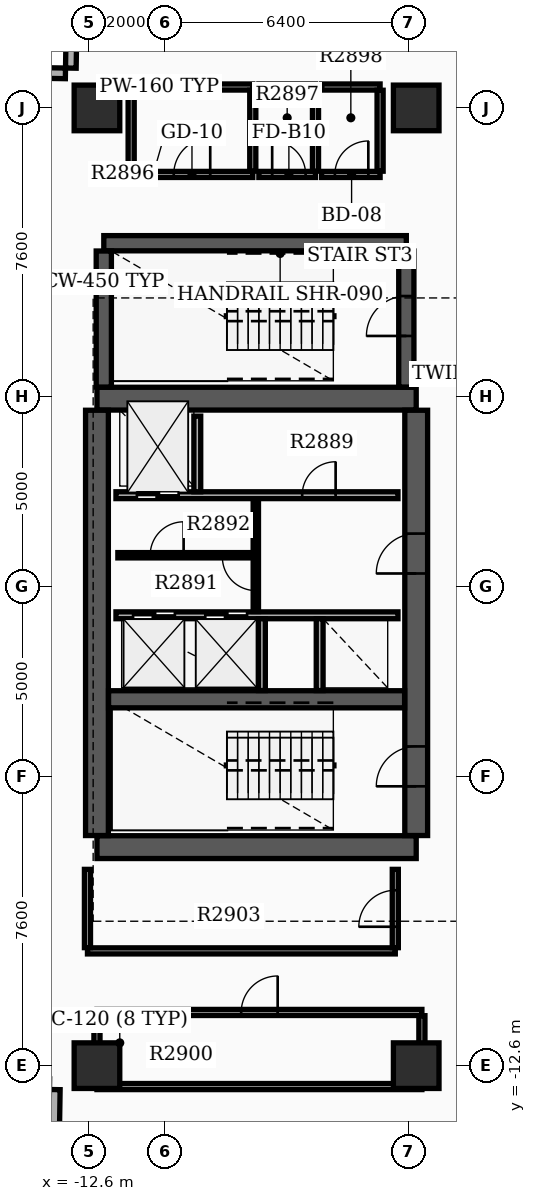
"""IFC4 building model, lengths in metres.
Left out: names, types, materials, properties, quantities, classifications, styles, units other than length and angle.
Written with IfcOpenShell. Run it as: python <this file> out.ifc"""

import sys

from ifc_helpers import new_model, si_unit, direction, frame, frame_2d, origin, origin_2d, place, context, subcontext, project, spatial, rectangle, extrude, element, fill, save


model = new_model("IFC4")
c1 = context("Model", 3, precision=1e-05, world=origin(), true_north=direction((0.0, 1.0)))
c2 = subcontext(c1, "Body", "Model", "MODEL_VIEW")
j1 = project(units=[si_unit("LENGTHUNIT", "METRE"), si_unit("PLANEANGLEUNIT", "RADIAN")], contexts=[c1])
p1 = place(None, origin())
s1 = spatial("IfcSite", under=j1, at=p1, CompositionType="ELEMENT")
p2 = place(p1, origin())
s2 = spatial("IfcBuilding", under=s1, at=p2, CompositionType="ELEMENT")
p3 = place(p2, frame((0.0, 0.0, 180.0)))
s3 = spatial("IfcBuildingStorey", under=s2, at=p3, CompositionType="ELEMENT", Elevation=180.0)
for number, where, z_axis, x_axis in (
    (1, (-12.4, -6.85, 0.0), (0.0, 0.0, 1.0), (1.0, 0.0, 0.0)),
    (2, (-12.4, 4.95, 0.0), (0.0, 0.0, 1.0), (1.0, 0.0, 0.0)),
):
    element("IfcWall", number, at=place(p3, frame(where, z_axis=z_axis, x_axis=x_axis)), inside=s3, PredefinedType="SHEAR", context=c2, shape_type="SweptSolid", body=[
        extrude(rectangle(XDim=8.4, YDim=0.6, at=frame_2d((4.2, 0.0))), origin(), (0.0, 0.0, 1.0), 3.7),
    ])
p4 = place(p3, frame((-12.4, -6.545, 0.0), z_axis=(0.0, 0.0, 1.0), x_axis=(0.0, 1.0, 0.0)))
e3 = element("IfcWall", 3, at=p4, inside=s3, PredefinedType="SHEAR", context=c2, shape_type="SweptSolid", body=[
    extrude(rectangle(XDim=11.19, YDim=0.6, at=frame_2d((5.595, 0.0))), origin(), (0.0, 0.0, 1.0), 3.7),
])
p5 = place(p3, frame((-4.0, -6.545, 0.0), z_axis=(0.0, 0.0, 1.0), x_axis=(0.0, 1.0, 0.0)))
e4 = element("IfcWall", 4, at=p5, inside=s3, PredefinedType="SHEAR", context=c2, shape_type="SweptSolid", body=[
    extrude(rectangle(XDim=11.19, YDim=0.6, at=frame_2d((5.595, 0.0))), origin(), (0.0, 0.0, 1.0), 3.7),
])
p6 = place(p5, frame((1.295, 0.0, 0.0)))
e5 = element("IfcOpeningElement", 5, at=p6, cuts=e4, PredefinedType="OPENING", context=c2, shape_type="SweptSolid", body=[
    extrude(rectangle(XDim=1.05, YDim=2.15, at=frame_2d((0.525, 1.075))), frame((0.0, 0.31, 0.0), z_axis=(0.0, -1.0, 0.0), x_axis=(1.0, 0.0, 0.0)), (0.0, 0.0, 1.0), 0.62),
])
p7 = place(p5, frame((6.895, 0.0, 0.0)))
e6 = element("IfcOpeningElement", 6, at=p7, cuts=e4, PredefinedType="OPENING", context=c2, shape_type="SweptSolid", body=[
    extrude(rectangle(XDim=1.05, YDim=2.15, at=frame_2d((0.525, 1.075))), frame((0.0, 0.31, 0.0), z_axis=(0.0, -1.0, 0.0), x_axis=(1.0, 0.0, 0.0)), (0.0, 0.0, 1.0), 0.62),
])
p8 = place(p3, frame((-12.095, -2.96, 0.0), z_axis=(0.0, 0.0, 1.0), x_axis=(1.0, 0.0, 0.0)))
e7 = element("IfcWall", 7, at=p8, inside=s3, PredefinedType="SHEAR", context=c2, shape_type="SweptSolid", body=[
    extrude(rectangle(XDim=7.79, YDim=0.45, at=frame_2d((3.895, 0.0))), origin(), (0.0, 0.0, 1.0), 3.7),
])
p9 = place(p3, frame((-12.22, 9.04, 0.0), z_axis=(0.0, 0.0, 1.0), x_axis=(1.0, 0.0, 0.0)))
e8 = element("IfcWall", 8, at=p9, inside=s3, PredefinedType="SHEAR", context=c2, shape_type="SweptSolid", body=[
    extrude(rectangle(XDim=7.96, YDim=0.4, at=frame_2d((3.98, 0.0))), origin(), (0.0, 0.0, 1.0), 3.7),
])
p10 = place(p3, frame((-12.22, 5.255, 0.0), z_axis=(0.0, 0.0, 1.0), x_axis=(0.0, 1.0, 0.0)))
e9 = element("IfcWall", 9, at=p10, inside=s3, PredefinedType="SHEAR", context=c2, shape_type="SweptSolid", body=[
    extrude(rectangle(XDim=3.58, YDim=0.4, at=frame_2d((1.79, 0.0))), origin(), (0.0, 0.0, 1.0), 3.7),
])
p11 = place(p3, frame((-4.26, 5.255, 0.0), z_axis=(0.0, 0.0, 1.0), x_axis=(0.0, 1.0, 0.0)))
e10 = element("IfcWall", 10, at=p11, inside=s3, PredefinedType="SHEAR", context=c2, shape_type="SweptSolid", body=[
    extrude(rectangle(XDim=3.58, YDim=0.4, at=frame_2d((1.79, 0.0))), origin(), (0.0, 0.0, 1.0), 3.7),
])
p12 = place(p11, frame((1.345, 0.0, 0.0)))
e11 = element("IfcOpeningElement", 11, at=p12, cuts=e10, PredefinedType="OPENING", context=c2, shape_type="SweptSolid", body=[
    extrude(rectangle(XDim=1.05, YDim=2.15, at=frame_2d((0.525, 1.075))), frame((0.0, 0.21, 0.0), z_axis=(0.0, -1.0, 0.0), x_axis=(1.0, 0.0, 0.0)), (0.0, 0.0, 1.0), 0.42),
])
for number, where, z_axis, x_axis in (
    (12, (-12.4, -12.6, 0.0), (0.0, 0.0, 1.0), (1.0, 0.0, 0.0)),
    (13, (-12.4, 12.6, 0.0), (0.0, 0.0, 1.0), (1.0, 0.0, 0.0)),
    (14, (-4.0, -12.6, 0.0), (0.0, 0.0, 1.0), (1.0, 0.0, 0.0)),
    (15, (-4.0, 12.6, 0.0), (0.0, 0.0, 1.0), (1.0, 0.0, 0.0)),
):
    element("IfcColumn", number, at=place(p3, frame(where, z_axis=z_axis, x_axis=x_axis)), inside=s3, PredefinedType="COLUMN", context=c2, shape_type="SweptSolid", body=[
        extrude(rectangle(XDim=1.2, YDim=1.2, at=origin_2d()), origin(), (0.0, 0.0, 1.0), 3.9),
    ])
p13 = place(p3, frame((-14.449, 13.529, 0.0), z_axis=(0.0, 0.0, 1.0), x_axis=(0.999878147354, -0.015610587569, 0.0)))
e16 = element("IfcWall", 16, at=p13, inside=s3, PredefinedType="STANDARD", context=c2, shape_type="SweptSolid", body=[
    extrude(rectangle(XDim=1.22, YDim=0.28, at=frame_2d((0.61, 0.0))), origin(), (0.0, 0.0, 1.0), 2.97),
])
p14 = place(p3, frame((-13.087, 13.647, 0.0), z_axis=(0.0, 0.0, 1.0), x_axis=(0.015785793208, 0.999875396603, 0.0)))
e17 = element("IfcWall", 17, at=p14, inside=s3, PredefinedType="STANDARD", context=c2, shape_type="SweptSolid", body=[
    extrude(rectangle(XDim=1.5, YDim=0.28, at=frame_2d((0.75, 0.0))), origin(), (0.0, 0.0, 1.0), 2.97),
])
p15 = place(p3, frame((-13.51, -13.229, 0.0), z_axis=(0.0, 0.0, 1.0), x_axis=(-0.015625635615, -0.999877912303, 0.0)))
e18 = element("IfcWall", 18, at=p15, inside=s3, PredefinedType="STANDARD", context=c2, shape_type="SweptSolid", body=[
    extrude(rectangle(XDim=1.5, YDim=0.28, at=frame_2d((0.75, 0.0))), origin(), (0.0, 0.0, 1.0), 2.97),
])
p16 = place(p3, frame((-11.9, 2.41, 0.0), z_axis=(0.0, 0.0, 1.0), x_axis=(1.0, 0.0, 0.0)))
e19 = element("IfcWall", 19, at=p16, inside=s3, PredefinedType="SOLIDWALL", context=c2, shape_type="SweptSolid", body=[
    extrude(rectangle(XDim=7.42, YDim=0.18, at=frame_2d((3.71, 0.0))), origin(), (0.0, 0.0, 1.0), 2.96),
])
p17 = place(p16, frame((0.55, 0.0, 0.0)))
e20 = element("IfcOpeningElement", 20, at=p17, cuts=e19, PredefinedType="OPENING", context=c2, shape_type="SweptSolid", body=[
    extrude(rectangle(XDim=1.1, YDim=2.15, at=frame_2d((0.55, 1.075))), frame((0.0, 0.1, 0.0), z_axis=(0.0, -1.0, 0.0), x_axis=(1.0, 0.0, 0.0)), (0.0, 0.0, 1.0), 0.2),
])
p18 = place(p16, frame((4.9, 0.0, 0.0)))
e21 = element("IfcOpeningElement", 21, at=p18, cuts=e19, PredefinedType="OPENING", context=c2, shape_type="SweptSolid", body=[
    extrude(rectangle(XDim=0.88, YDim=2.1, at=frame_2d((0.44, 1.05))), frame((0.0, 0.1, 0.0), z_axis=(0.0, -1.0, 0.0), x_axis=(1.0, 0.0, 0.0)), (0.0, 0.0, 1.0), 0.2),
])
p19 = place(p3, frame((-11.9, -0.75, 0.0), z_axis=(0.0, 0.0, 1.0), x_axis=(1.0, 0.0, 0.0)))
e22 = element("IfcWall", 22, at=p19, inside=s3, PredefinedType="SOLIDWALL", context=c2, shape_type="SweptSolid", body=[
    extrude(rectangle(XDim=7.42, YDim=0.18, at=frame_2d((3.71, 0.0))), origin(), (0.0, 0.0, 1.0), 2.96),
])
p20 = place(p19, frame((0.45, 0.0, 0.0)))
e23 = element("IfcOpeningElement", 23, at=p20, cuts=e22, PredefinedType="OPENING", context=c2, shape_type="SweptSolid", body=[
    extrude(rectangle(XDim=1.1, YDim=2.15, at=frame_2d((0.55, 1.075))), frame((0.0, 0.1, 0.0), z_axis=(0.0, -1.0, 0.0), x_axis=(1.0, 0.0, 0.0)), (0.0, 0.0, 1.0), 0.2),
])
p21 = place(p19, frame((2.35, 0.0, 0.0)))
e24 = element("IfcOpeningElement", 24, at=p21, cuts=e22, PredefinedType="OPENING", context=c2, shape_type="SweptSolid", body=[
    extrude(rectangle(XDim=1.1, YDim=2.15, at=frame_2d((0.55, 1.075))), frame((0.0, 0.1, 0.0), z_axis=(0.0, -1.0, 0.0), x_axis=(1.0, 0.0, 0.0)), (0.0, 0.0, 1.0), 0.2),
])
p22 = place(p3, frame((-9.76, 2.5, 0.0), z_axis=(0.0, 0.0, 1.0), x_axis=(0.0, 1.0, 0.0)))
e25 = element("IfcWall", 25, at=p22, inside=s3, PredefinedType="SOLIDWALL", context=c2, shape_type="SweptSolid", body=[
    extrude(rectangle(XDim=1.99, YDim=0.18, at=frame_2d((0.995, 0.0))), origin(), (0.0, 0.0, 1.0), 2.96),
])
for number, where, z_axis, x_axis in (
    (26, (-8.06, -2.73, 0.0), (0.0, 0.0, 1.0), (0.0, 1.0, 0.0)),
    (27, (-6.54, -2.73, 0.0), (0.0, 0.0, 1.0), (0.0, 1.0, 0.0)),
):
    element("IfcWall", number, at=place(p3, frame(where, z_axis=z_axis, x_axis=x_axis)), inside=s3, PredefinedType="SOLIDWALL", context=c2, shape_type="SweptSolid", body=[
        extrude(rectangle(XDim=1.89, YDim=0.18, at=frame_2d((0.945, 0.0))), origin(), (0.0, 0.0, 1.0), 2.96),
    ])
p23 = place(p3, frame((-8.22, -0.65, 0.0), z_axis=(0.0, 0.0, 1.0), x_axis=(0.0, 1.0, 0.0)))
e28 = element("IfcWall", 28, at=p23, inside=s3, PredefinedType="SOLIDWALL", context=c2, shape_type="SweptSolid", body=[
    extrude(rectangle(XDim=2.96, YDim=0.14, at=frame_2d((1.48, 0.0))), origin(), (0.0, 0.0, 1.0), 2.96),
])
p24 = place(p23, frame((0.55, 0.0, 0.0)))
e29 = element("IfcOpeningElement", 29, at=p24, cuts=e28, PredefinedType="OPENING", context=c2, shape_type="SweptSolid", body=[
    extrude(rectangle(XDim=0.88, YDim=2.1, at=frame_2d((0.44, 1.05))), frame((0.0, 0.08, 0.0), z_axis=(0.0, -1.0, 0.0), x_axis=(1.0, 0.0, 0.0)), (0.0, 0.0, 1.0), 0.16),
])
p25 = place(p3, frame((-11.85, 0.83, 0.0), z_axis=(0.0, 0.0, 1.0), x_axis=(1.0, 0.0, 0.0)))
e30 = element("IfcWall", 30, at=p25, inside=s3, PredefinedType="PARTITIONING", context=c2, shape_type="SweptSolid", body=[
    extrude(rectangle(XDim=3.552, YDim=0.14, at=frame_2d((1.776, 0.0))), origin(), (0.0, 0.0, 1.0), 2.96),
])
p26 = place(p25, frame((0.85, 0.0, 0.0)))
e31 = element("IfcOpeningElement", 31, at=p26, cuts=e30, PredefinedType="OPENING", context=c2, shape_type="SweptSolid", body=[
    extrude(rectangle(XDim=0.88, YDim=2.1, at=frame_2d((0.44, 1.05))), frame((0.0, 0.08, 0.0), z_axis=(0.0, -1.0, 0.0), x_axis=(1.0, 0.0, 0.0)), (0.0, 0.0, 1.0), 0.16),
])
p27 = place(p3, frame((-11.5, 10.85, 0.0), z_axis=(0.0, 0.0, 1.0), x_axis=(1.0, 0.0, 0.0)))
e32 = element("IfcWall", 32, at=p27, inside=s3, PredefinedType="PARTITIONING", context=c2, shape_type="SweptSolid", body=[
    extrude(rectangle(XDim=3.2, YDim=0.16, at=frame_2d((1.6, 0.0))), origin(), (0.0, 0.0, 1.0), 2.96),
])
p28 = place(p27, frame((1.12, 0.0, 0.0)))
e33 = element("IfcOpeningElement", 33, at=p28, cuts=e32, PredefinedType="OPENING", context=c2, shape_type="SweptSolid", body=[
    extrude(rectangle(XDim=0.96, YDim=2.15, at=frame_2d((0.48, 1.075))), frame((0.0, 0.09, 0.0), z_axis=(0.0, -1.0, 0.0), x_axis=(1.0, 0.0, 0.0)), (0.0, 0.0, 1.0), 0.18),
])
p29 = place(p3, frame((-11.5, 13.15, 0.0), z_axis=(0.0, 0.0, 1.0), x_axis=(1.0, 0.0, 0.0)))
e34 = element("IfcWall", 34, at=p29, inside=s3, PredefinedType="PARTITIONING", context=c2, shape_type="SweptSolid", body=[
    extrude(rectangle(XDim=3.2, YDim=0.16, at=frame_2d((1.6, 0.0))), origin(), (0.0, 0.0, 1.0), 2.96),
])
for number, where, z_axis, x_axis in (
    (35, (-11.5, 10.935, 0.0), (0.0, 0.0, 1.0), (0.0, 1.0, 0.0)),
    (36, (-8.3, 10.935, 0.0), (0.0, 0.0, 1.0), (0.0, 1.0, 0.0)),
):
    element("IfcWall", number, at=place(p3, frame(where, z_axis=z_axis, x_axis=x_axis)), inside=s3, PredefinedType="PARTITIONING", context=c2, shape_type="SweptSolid", body=[
        extrude(rectangle(XDim=2.13, YDim=0.16, at=frame_2d((1.065, 0.0))), origin(), (0.0, 0.0, 1.0), 2.96),
    ])
p30 = place(p3, frame((-8.14, 10.85, 0.0), z_axis=(0.0, 0.0, 1.0), x_axis=(1.0, 0.0, 0.0)))
e37 = element("IfcWall", 37, at=p30, inside=s3, PredefinedType="PARTITIONING", context=c2, shape_type="SweptSolid", body=[
    extrude(rectangle(XDim=1.49, YDim=0.16, at=frame_2d((0.745, 0.0))), origin(), (0.0, 0.0, 1.0), 2.96),
])
p31 = place(p30, frame((0.35, 0.0, 0.0)))
e38 = element("IfcOpeningElement", 38, at=p31, cuts=e37, PredefinedType="OPENING", context=c2, shape_type="SweptSolid", body=[
    extrude(rectangle(XDim=0.88, YDim=2.1, at=frame_2d((0.44, 1.05))), frame((0.0, 0.09, 0.0), z_axis=(0.0, -1.0, 0.0), x_axis=(1.0, 0.0, 0.0)), (0.0, 0.0, 1.0), 0.18),
])
p32 = place(p3, frame((-8.14, 13.15, 0.0), z_axis=(0.0, 0.0, 1.0), x_axis=(1.0, 0.0, 0.0)))
e39 = element("IfcWall", 39, at=p32, inside=s3, PredefinedType="PARTITIONING", context=c2, shape_type="SweptSolid", body=[
    extrude(rectangle(XDim=1.49, YDim=0.16, at=frame_2d((0.745, 0.0))), origin(), (0.0, 0.0, 1.0), 2.96),
])
p33 = place(p3, frame((-6.65, 10.935, 0.0), z_axis=(0.0, 0.0, 1.0), x_axis=(0.0, 1.0, 0.0)))
e40 = element("IfcWall", 40, at=p33, inside=s3, PredefinedType="PARTITIONING", context=c2, shape_type="SweptSolid", body=[
    extrude(rectangle(XDim=2.13, YDim=0.16, at=frame_2d((1.065, 0.0))), origin(), (0.0, 0.0, 1.0), 2.96),
])
p34 = place(p3, frame((-6.49, 10.85, 0.0), z_axis=(0.0, 0.0, 1.0), x_axis=(1.0, 0.0, 0.0)))
e41 = element("IfcWall", 41, at=p34, inside=s3, PredefinedType="PARTITIONING", context=c2, shape_type="SweptSolid", body=[
    extrude(rectangle(XDim=1.54, YDim=0.16, at=frame_2d((0.77, 0.0))), origin(), (0.0, 0.0, 1.0), 2.96),
])
p35 = place(p34, frame((0.35, 0.0, 0.0)))
e42 = element("IfcOpeningElement", 42, at=p35, cuts=e41, PredefinedType="OPENING", context=c2, shape_type="SweptSolid", body=[
    extrude(rectangle(XDim=0.88, YDim=2.15, at=frame_2d((0.44, 1.075))), frame((0.0, 0.09, 0.0), z_axis=(0.0, -1.0, 0.0), x_axis=(1.0, 0.0, 0.0)), (0.0, 0.0, 1.0), 0.18),
])
p36 = place(p3, frame((-6.49, 13.15, 0.0), z_axis=(0.0, 0.0, 1.0), x_axis=(1.0, 0.0, 0.0)))
e43 = element("IfcWall", 43, at=p36, inside=s3, PredefinedType="PARTITIONING", context=c2, shape_type="SweptSolid", body=[
    extrude(rectangle(XDim=1.54, YDim=0.16, at=frame_2d((0.77, 0.0))), origin(), (0.0, 0.0, 1.0), 2.96),
])
p37 = place(p3, frame((-4.95, 10.935, 0.0), z_axis=(0.0, 0.0, 1.0), x_axis=(0.0, 1.0, 0.0)))
e44 = element("IfcWall", 44, at=p37, inside=s3, PredefinedType="PARTITIONING", context=c2, shape_type="SweptSolid", body=[
    extrude(rectangle(XDim=2.13, YDim=0.16, at=frame_2d((1.065, 0.0))), origin(), (0.0, 0.0, 1.0), 2.96),
])
p38 = place(p3, frame((-12.4, -13.15, 0.0), z_axis=(0.0, 0.0, 1.0), x_axis=(1.0, 0.0, 0.0)))
e45 = element("IfcWall", 45, at=p38, inside=s3, PredefinedType="PARTITIONING", context=c2, shape_type="SweptSolid", body=[
    extrude(rectangle(XDim=8.55, YDim=0.16, at=frame_2d((4.275, 0.0))), origin(), (0.0, 0.0, 1.0), 2.96),
])
p39 = place(p3, frame((-12.4, -11.2, 0.0), z_axis=(0.0, 0.0, 1.0), x_axis=(1.0, 0.0, 0.0)))
e46 = element("IfcWall", 46, at=p39, inside=s3, PredefinedType="PARTITIONING", context=c2, shape_type="SweptSolid", body=[
    extrude(rectangle(XDim=8.55, YDim=0.16, at=frame_2d((4.275, 0.0))), origin(), (0.0, 0.0, 1.0), 2.96),
])
p40 = place(p39, frame((3.795, 0.0, 0.0)))
e47 = element("IfcOpeningElement", 47, at=p40, cuts=e46, PredefinedType="OPENING", context=c2, shape_type="SweptSolid", body=[
    extrude(rectangle(XDim=0.96, YDim=2.15, at=frame_2d((0.48, 1.075))), frame((0.0, 0.09, 0.0), z_axis=(0.0, -1.0, 0.0), x_axis=(1.0, 0.0, 0.0)), (0.0, 0.0, 1.0), 0.18),
])
for number, where, z_axis, x_axis in (
    (48, (-12.4, -13.065, 0.0), (0.0, 0.0, 1.0), (0.0, 1.0, 0.0)),
    (49, (-3.85, -13.065, 0.0), (0.0, 0.0, 1.0), (0.0, 1.0, 0.0)),
):
    element("IfcWall", number, at=place(p3, frame(where, z_axis=z_axis, x_axis=x_axis)), inside=s3, PredefinedType="PARTITIONING", context=c2, shape_type="SweptSolid", body=[
        extrude(rectangle(XDim=1.78, YDim=0.16, at=frame_2d((0.89, 0.0))), origin(), (0.0, 0.0, 1.0), 2.96),
    ])
p41 = place(p3, frame((-12.65, -9.58, 0.0), z_axis=(0.0, 0.0, 1.0), x_axis=(1.0, 0.0, 0.0)))
e50 = element("IfcWall", 50, at=p41, inside=s3, PredefinedType="PARTITIONING", context=c2, shape_type="SweptSolid", body=[
    extrude(rectangle(XDim=8.1, YDim=0.16, at=frame_2d((4.05, 0.0))), origin(), (0.0, 0.0, 1.0), 2.96),
])
p42 = place(p3, frame((-12.65, -9.495, 0.0), z_axis=(0.0, 0.0, 1.0), x_axis=(0.0, 1.0, 0.0)))
e51 = element("IfcWall", 51, at=p42, inside=s3, PredefinedType="PARTITIONING", context=c2, shape_type="SweptSolid", body=[
    extrude(rectangle(XDim=2.06, YDim=0.16, at=frame_2d((1.03, 0.0))), origin(), (0.0, 0.0, 1.0), 2.96),
])
p43 = place(p3, frame((-4.55, -9.495, 0.0), z_axis=(0.0, 0.0, 1.0), x_axis=(0.0, 1.0, 0.0)))
e52 = element("IfcWall", 52, at=p43, inside=s3, PredefinedType="PARTITIONING", context=c2, shape_type="SweptSolid", body=[
    extrude(rectangle(XDim=2.06, YDim=0.16, at=frame_2d((1.03, 0.0))), origin(), (0.0, 0.0, 1.0), 2.96),
])
p44 = place(p43, frame((0.55, 0.0, 0.0)))
e53 = element("IfcOpeningElement", 53, at=p44, cuts=e52, PredefinedType="OPENING", context=c2, shape_type="SweptSolid", body=[
    extrude(rectangle(XDim=0.96, YDim=2.15, at=frame_2d((0.48, 1.075))), frame((0.0, 0.09, 0.0), z_axis=(0.0, -1.0, 0.0), x_axis=(1.0, 0.0, 0.0)), (0.0, 0.0, 1.0), 0.18),
])
p45 = place(p6, origin())
e54 = element("IfcDoor", 54, at=p45, inside=s3, OperationType="SINGLE_SWING_LEFT", PredefinedType="DOOR", context=c2, shape_type="SweptSolid", body=[
    extrude(rectangle(XDim=1.05, YDim=2.15, at=frame_2d((0.525, 1.075))), frame((0.0, 0.025, 0.0), z_axis=(0.0, -1.0, 0.0), x_axis=(1.0, 0.0, 0.0)), (0.0, 0.0, 1.0), 0.05),
])
fill(e5, e54)
p46 = place(p7, origin())
e55 = element("IfcDoor", 55, at=p46, inside=s3, OperationType="SINGLE_SWING_LEFT", PredefinedType="DOOR", context=c2, shape_type="SweptSolid", body=[
    extrude(rectangle(XDim=1.05, YDim=2.15, at=frame_2d((0.525, 1.075))), frame((0.0, 0.025, 0.0), z_axis=(0.0, -1.0, 0.0), x_axis=(1.0, 0.0, 0.0)), (0.0, 0.0, 1.0), 0.05),
])
fill(e6, e55)
p47 = place(p12, origin())
e56 = element("IfcDoor", 56, at=p47, inside=s3, OperationType="SINGLE_SWING_LEFT", PredefinedType="DOOR", context=c2, shape_type="SweptSolid", body=[
    extrude(rectangle(XDim=1.05, YDim=2.15, at=frame_2d((0.525, 1.075))), frame((0.0, 0.025, 0.0), z_axis=(0.0, -1.0, 0.0), x_axis=(1.0, 0.0, 0.0)), (0.0, 0.0, 1.0), 0.05),
])
fill(e11, e56)
p48 = place(p17, origin())
e57 = element("IfcDoor", 57, at=p48, inside=s3, OperationType="DOUBLE_DOOR_SLIDING", PredefinedType="DOOR", context=c2, shape_type="SweptSolid", body=[
    extrude(rectangle(XDim=1.1, YDim=2.15, at=frame_2d((0.55, 1.075))), frame((0.0, 0.025, 0.0), z_axis=(0.0, -1.0, 0.0), x_axis=(1.0, 0.0, 0.0)), (0.0, 0.0, 1.0), 0.05),
])
fill(e20, e57)
p49 = place(p20, origin())
e58 = element("IfcDoor", 58, at=p49, inside=s3, OperationType="DOUBLE_DOOR_SLIDING", PredefinedType="DOOR", context=c2, shape_type="SweptSolid", body=[
    extrude(rectangle(XDim=1.1, YDim=2.15, at=frame_2d((0.55, 1.075))), frame((0.0, 0.025, 0.0), z_axis=(0.0, -1.0, 0.0), x_axis=(1.0, 0.0, 0.0)), (0.0, 0.0, 1.0), 0.05),
])
fill(e23, e58)
p50 = place(p21, origin())
e59 = element("IfcDoor", 59, at=p50, inside=s3, OperationType="DOUBLE_DOOR_SLIDING", PredefinedType="DOOR", context=c2, shape_type="SweptSolid", body=[
    extrude(rectangle(XDim=1.1, YDim=2.15, at=frame_2d((0.55, 1.075))), frame((0.0, 0.025, 0.0), z_axis=(0.0, -1.0, 0.0), x_axis=(1.0, 0.0, 0.0)), (0.0, 0.0, 1.0), 0.05),
])
fill(e24, e59)
p51 = place(p18, origin())
e60 = element("IfcDoor", 60, at=p51, inside=s3, OperationType="SINGLE_SWING_RIGHT", PredefinedType="DOOR", context=c2, shape_type="SweptSolid", body=[
    extrude(rectangle(XDim=0.88, YDim=2.1, at=frame_2d((0.44, 1.05))), frame((0.0, 0.025, 0.0), z_axis=(0.0, -1.0, 0.0), x_axis=(1.0, 0.0, 0.0)), (0.0, 0.0, 1.0), 0.05),
])
fill(e21, e60)
p52 = place(p24, origin())
e61 = element("IfcDoor", 61, at=p52, inside=s3, OperationType="SINGLE_SWING_RIGHT", PredefinedType="DOOR", context=c2, shape_type="SweptSolid", body=[
    extrude(rectangle(XDim=0.88, YDim=2.1, at=frame_2d((0.44, 1.05))), frame((0.0, 0.025, 0.0), z_axis=(0.0, -1.0, 0.0), x_axis=(1.0, 0.0, 0.0)), (0.0, 0.0, 1.0), 0.05),
])
fill(e29, e61)
p53 = place(p26, origin())
e62 = element("IfcDoor", 62, at=p53, inside=s3, OperationType="SINGLE_SWING_RIGHT", PredefinedType="DOOR", context=c2, shape_type="SweptSolid", body=[
    extrude(rectangle(XDim=0.88, YDim=2.1, at=frame_2d((0.44, 1.05))), frame((0.0, 0.025, 0.0), z_axis=(0.0, -1.0, 0.0), x_axis=(1.0, 0.0, 0.0)), (0.0, 0.0, 1.0), 0.05),
])
fill(e31, e62)
p54 = place(p28, origin())
e63 = element("IfcDoor", 63, at=p54, inside=s3, OperationType="SINGLE_SWING_RIGHT", PredefinedType="DOOR", context=c2, shape_type="SweptSolid", body=[
    extrude(rectangle(XDim=0.96, YDim=2.15, at=frame_2d((0.48, 1.075))), frame((0.0, 0.025, 0.0), z_axis=(0.0, -1.0, 0.0), x_axis=(1.0, 0.0, 0.0)), (0.0, 0.0, 1.0), 0.05),
])
fill(e33, e63)
p55 = place(p31, origin())
e64 = element("IfcDoor", 64, at=p55, inside=s3, OperationType="SINGLE_SWING_LEFT", PredefinedType="DOOR", context=c2, shape_type="SweptSolid", body=[
    extrude(rectangle(XDim=0.88, YDim=2.1, at=frame_2d((0.44, 1.05))), frame((0.0, 0.025, 0.0), z_axis=(0.0, -1.0, 0.0), x_axis=(1.0, 0.0, 0.0)), (0.0, 0.0, 1.0), 0.05),
])
fill(e38, e64)
p56 = place(p35, origin())
e65 = element("IfcDoor", 65, at=p56, inside=s3, OperationType="SINGLE_SWING_RIGHT", PredefinedType="DOOR", context=c2, shape_type="SweptSolid", body=[
    extrude(rectangle(XDim=0.88, YDim=2.15, at=frame_2d((0.44, 1.075))), frame((0.0, 0.025, 0.0), z_axis=(0.0, -1.0, 0.0), x_axis=(1.0, 0.0, 0.0)), (0.0, 0.0, 1.0), 0.05),
])
fill(e42, e65)
p57 = place(p40, origin())
e66 = element("IfcDoor", 66, at=p57, inside=s3, OperationType="SINGLE_SWING_RIGHT", PredefinedType="DOOR", context=c2, shape_type="SweptSolid", body=[
    extrude(rectangle(XDim=0.96, YDim=2.15, at=frame_2d((0.48, 1.075))), frame((0.0, 0.025, 0.0), z_axis=(0.0, -1.0, 0.0), x_axis=(1.0, 0.0, 0.0)), (0.0, 0.0, 1.0), 0.05),
])
fill(e47, e66)
p58 = place(p44, origin())
e67 = element("IfcDoor", 67, at=p58, inside=s3, OperationType="SINGLE_SWING_LEFT", PredefinedType="DOOR", context=c2, shape_type="SweptSolid", body=[
    extrude(rectangle(XDim=0.96, YDim=2.15, at=frame_2d((0.48, 1.075))), frame((0.0, 0.025, 0.0), z_axis=(0.0, -1.0, 0.0), x_axis=(1.0, 0.0, 0.0)), (0.0, 0.0, 1.0), 0.05),
])
fill(e53, e67)
save(model, sys.argv[1])
